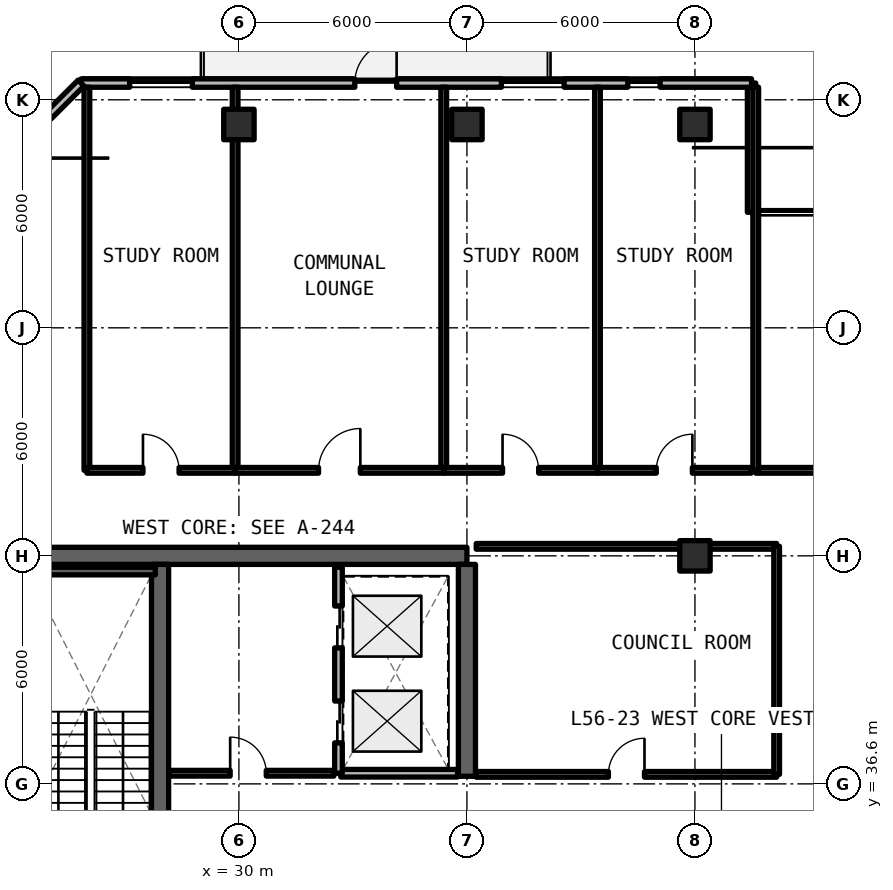
"""IFC4 building model, lengths in metres.
Left out: names, types, materials, properties, quantities, classifications, styles, units other than length and angle.
Written with IfcOpenShell. Run it as: python <this file> out.ifc"""

import sys

from ifc_helpers import new_model, si_unit, direction, frame, frame_2d, origin, origin_2d, place, context, subcontext, project, spatial, rectangle, extrude, element, fill, save


model = new_model("IFC4")
c1 = context("Model", 3, precision=1e-05, world=origin(), true_north=direction((0.0, 1.0)))
c2 = subcontext(c1, "Body", "Model", "MODEL_VIEW")
j1 = project(units=[si_unit("LENGTHUNIT", "METRE"), si_unit("PLANEANGLEUNIT", "RADIAN")], contexts=[c1])
p1 = place(None, origin())
s1 = spatial("IfcSite", under=j1, at=p1, CompositionType="ELEMENT")
p2 = place(p1, origin())
s2 = spatial("IfcBuilding", under=s1, at=p2, CompositionType="ELEMENT")
p3 = place(p2, frame((0.0, 0.0, 201.63)))
s3 = spatial("IfcBuildingStorey", under=s2, at=p3, CompositionType="ELEMENT", Elevation=201.63)
p4 = place(p3, frame((36.0, 42.6, 0.0), z_axis=(0.0, 0.0, 1.0), x_axis=(-1.0, 0.0, 0.0)))
e1 = element("IfcWall", 1, at=p4, inside=s3, PredefinedType="SHEAR", context=c2, shape_type="SweptSolid", body=[
    extrude(rectangle(XDim=12.0, YDim=0.45, at=frame_2d((6.0, 0.0))), origin(), (0.0, 0.0, 1.0), 3.3),
])
p5 = place(p3, frame((36.0, 36.8, 0.0), z_axis=(0.0, 0.0, 1.0), x_axis=(0.0, 1.0, 0.0)))
e2 = element("IfcWall", 2, at=p5, inside=s3, PredefinedType="SHEAR", context=c2, shape_type="SweptSolid", body=[
    extrude(rectangle(XDim=5.575, YDim=0.45, at=frame_2d((2.788, 0.0))), origin(), (0.0, 0.0, 1.0), 3.3),
])
p6 = place(p3, frame((27.925, 24.825, 0.0), z_axis=(0.0, 0.0, 1.0), x_axis=(0.0, 1.0, 0.0)))
e3 = element("IfcWall", 3, at=p6, inside=s3, PredefinedType="SHEAR", context=c2, shape_type="SweptSolid", body=[
    extrude(rectangle(XDim=17.55, YDim=0.45, at=frame_2d((8.775, 0.0))), origin(), (0.0, 0.0, 1.0), 3.3),
])
p7 = place(p6, frame((0.425, 0.0, 0.0)))
e4 = element("IfcOpeningElement", 4, at=p7, cuts=e3, PredefinedType="OPENING", context=c2, shape_type="SweptSolid", body=[
    extrude(rectangle(XDim=1.15, YDim=2.15, at=frame_2d((0.575, 1.075))), frame((0.0, 0.235, 0.0), z_axis=(0.0, -1.0, 0.0), x_axis=(1.0, 0.0, 0.0)), (0.0, 0.0, 1.0), 0.47),
])
p8 = place(p6, frame((9.625, 0.0, 0.0)))
e5 = element("IfcOpeningElement", 5, at=p8, cuts=e3, PredefinedType="OPENING", context=c2, shape_type="SweptSolid", body=[
    extrude(rectangle(XDim=1.15, YDim=2.15, at=frame_2d((0.575, 1.075))), frame((0.0, 0.235, 0.0), z_axis=(0.0, -1.0, 0.0), x_axis=(1.0, 0.0, 0.0)), (0.0, 0.0, 1.0), 0.47),
])
for number, where, z_axis, x_axis in (
    (6, (42.0, 42.6, 0.0), (0.0, 0.0, 1.0), (1.0, 0.0, 0.0)),
    (7, (30.0, 53.95, 0.0), (0.0, 0.0, 1.0), (1.0, 0.0, 0.0)),
    (8, (36.0, 53.95, 0.0), (0.0, 0.0, 1.0), (1.0, 0.0, 0.0)),
    (9, (42.0, 53.95, 0.0), (0.0, 0.0, 1.0), (1.0, 0.0, 0.0)),
):
    element("IfcColumn", number, at=place(p3, frame(where, z_axis=z_axis, x_axis=x_axis)), inside=s3, PredefinedType="COLUMN", context=c2, shape_type="SweptSolid", body=[
        extrude(rectangle(XDim=0.8, YDim=0.8, at=origin_2d()), origin(), (0.0, 0.0, 1.0), 3.3),
    ])
p9 = place(p3, frame((43.49, 51.64, 0.0), z_axis=(0.0, 0.0, 1.0), x_axis=(0.0, 1.0, 0.0)))
e10 = element("IfcWall", 10, at=p9, inside=s3, PredefinedType="SOLIDWALL", context=c2, shape_type="SweptSolid", body=[
    extrude(rectangle(XDim=3.4, YDim=0.22, at=frame_2d((1.7, 0.0))), origin(), (0.0, 0.0, 1.0), 3.08),
])
p10 = place(p3, frame((43.49, 55.04, 0.0), z_axis=(0.0, 0.0, 1.0), x_axis=(-1.0, 0.0, 0.0)))
e11 = element("IfcWall", 11, at=p10, inside=s3, PredefinedType="SOLIDWALL", context=c2, shape_type="SweptSolid", body=[
    extrude(rectangle(XDim=17.644, YDim=0.22, at=frame_2d((8.822, 0.0))), origin(), (0.0, 0.0, 1.0), 3.08),
])
p11 = place(p10, frame((9.34, 0.0, 0.0)))
e12 = element("IfcOpeningElement", 12, at=p11, cuts=e11, PredefinedType="OPENING", context=c2, shape_type="SweptSolid", body=[
    extrude(rectangle(XDim=1.1, YDim=2.15, at=frame_2d((0.55, 1.075))), frame((0.0, 0.12, 0.0), z_axis=(0.0, -1.0, 0.0), x_axis=(1.0, 0.0, 0.0)), (0.0, 0.0, 1.0), 0.24),
])
p12 = place(p10, frame((14.715, 0.0, 0.78)))
e13 = element("IfcOpeningElement", 13, at=p12, cuts=e11, PredefinedType="OPENING", context=c2, shape_type="SweptSolid", body=[
    extrude(rectangle(XDim=1.65, YDim=1.66, at=frame_2d((0.825, 0.83))), frame((0.0, 0.12, 0.0), z_axis=(0.0, -1.0, 0.0), x_axis=(1.0, 0.0, 0.0)), (0.0, 0.0, 1.0), 0.24),
])
p13 = place(p10, frame((4.932, 0.0, 0.78)))
e14 = element("IfcOpeningElement", 14, at=p13, cuts=e11, PredefinedType="OPENING", context=c2, shape_type="SweptSolid", body=[
    extrude(rectangle(XDim=1.65, YDim=1.66, at=frame_2d((0.825, 0.83))), frame((0.0, 0.12, 0.0), z_axis=(0.0, -1.0, 0.0), x_axis=(1.0, 0.0, 0.0)), (0.0, 0.0, 1.0), 0.24),
])
p14 = place(p10, frame((2.407, 0.0, 0.78)))
e15 = element("IfcOpeningElement", 15, at=p14, cuts=e11, PredefinedType="OPENING", context=c2, shape_type="SweptSolid", body=[
    extrude(rectangle(XDim=0.85, YDim=1.65, at=frame_2d((0.425, 0.825))), frame((0.0, 0.12, 0.0), z_axis=(0.0, -1.0, 0.0), x_axis=(1.0, 0.0, 0.0)), (0.0, 0.0, 1.0), 0.24),
])
p15 = place(p3, frame((25.846, 55.04, 0.0), z_axis=(0.0, 0.0, 1.0), x_axis=(-0.707106781187, -0.707106781187, 0.0)))
e16 = element("IfcWall", 16, at=p15, inside=s3, PredefinedType="SOLIDWALL", context=c2, shape_type="SweptSolid", body=[
    extrude(rectangle(XDim=5.849, YDim=0.22, at=frame_2d((2.924, 0.0))), origin(), (0.0, 0.0, 1.0), 3.08),
])
p16 = place(p15, frame((1.224, 0.0, 0.78)))
e17 = element("IfcOpeningElement", 17, at=p16, cuts=e16, PredefinedType="OPENING", context=c2, shape_type="SweptSolid", body=[
    extrude(rectangle(XDim=3.4, YDim=1.66, at=frame_2d((1.7, 0.83))), frame((0.0, 0.12, 0.0), z_axis=(0.0, -1.0, 0.0), x_axis=(1.0, 0.0, 0.0)), (0.0, 0.0, 1.0), 0.24),
])
p17 = place(p3, frame((28.17, 36.88, 0.0), z_axis=(0.0, 0.0, 1.0), x_axis=(1.0, 0.0, 0.0)))
e18 = element("IfcWall", 18, at=p17, inside=s3, PredefinedType="SOLIDWALL", context=c2, shape_type="SweptSolid", body=[
    extrude(rectangle(XDim=4.33, YDim=0.15, at=frame_2d((2.165, 0.0))), origin(), (0.0, 0.0, 1.0), 2.35),
])
p18 = place(p17, frame((1.6, 0.0, 0.0)))
e19 = element("IfcOpeningElement", 19, at=p18, cuts=e18, PredefinedType="OPENING", context=c2, shape_type="SweptSolid", body=[
    extrude(rectangle(XDim=0.95, YDim=2.15, at=frame_2d((0.475, 1.075))), frame((0.0, 0.085, 0.0), z_axis=(0.0, -1.0, 0.0), x_axis=(1.0, 0.0, 0.0)), (0.0, 0.0, 1.0), 0.17),
])
p19 = place(p3, frame((32.68, 36.88, 0.0), z_axis=(0.0, 0.0, 1.0), x_axis=(1.0, 0.0, 0.0)))
e20 = element("IfcWall", 20, at=p19, inside=s3, PredefinedType="SOLIDWALL", context=c2, shape_type="SweptSolid", body=[
    extrude(rectangle(XDim=3.075, YDim=0.2, at=frame_2d((1.538, 0.0))), origin(), (0.0, 0.0, 1.0), 2.35),
])
p20 = place(p3, frame((32.62, 36.88, 0.0), z_axis=(0.0, 0.0, 1.0), x_axis=(0.0, 1.0, 0.0)))
e21 = element("IfcWall", 21, at=p20, inside=s3, PredefinedType="SOLIDWALL", context=c2, shape_type="SweptSolid", body=[
    extrude(rectangle(XDim=5.42, YDim=0.2, at=frame_2d((2.71, 0.0))), origin(), (0.0, 0.0, 1.0), 2.35),
])
p21 = place(p20, frame((0.8, 0.0, 0.0)))
e22 = element("IfcOpeningElement", 22, at=p21, cuts=e21, PredefinedType="OPENING", context=c2, shape_type="SweptSolid", body=[
    extrude(rectangle(XDim=1.1, YDim=2.2, at=frame_2d((0.55, 1.1))), frame((0.0, 0.11, 0.0), z_axis=(0.0, -1.0, 0.0), x_axis=(1.0, 0.0, 0.0)), (0.0, 0.0, 1.0), 0.22),
])
p22 = place(p20, frame((3.3, 0.0, 0.0)))
e23 = element("IfcOpeningElement", 23, at=p22, cuts=e21, PredefinedType="OPENING", context=c2, shape_type="SweptSolid", body=[
    extrude(rectangle(XDim=1.1, YDim=2.2, at=frame_2d((0.55, 1.1))), frame((0.0, 0.11, 0.0), z_axis=(0.0, -1.0, 0.0), x_axis=(1.0, 0.0, 0.0)), (0.0, 0.0, 1.0), 0.22),
])
p23 = place(p3, frame((36.245, 36.85, 0.0), z_axis=(0.0, 0.0, 1.0), x_axis=(1.0, 0.0, 0.0)))
e24 = element("IfcWall", 24, at=p23, inside=s3, PredefinedType="SOLIDWALL", context=c2, shape_type="SweptSolid", body=[
    extrude(rectangle(XDim=7.905, YDim=0.15, at=frame_2d((3.952, 0.0))), origin(), (0.0, 0.0, 1.0), 2.35),
])
p24 = place(p23, frame((3.478, 0.0, 0.0)))
e25 = element("IfcOpeningElement", 25, at=p24, cuts=e24, PredefinedType="OPENING", context=c2, shape_type="SweptSolid", body=[
    extrude(rectangle(XDim=0.95, YDim=2.15, at=frame_2d((0.475, 1.075))), frame((0.0, 0.085, 0.0), z_axis=(0.0, -1.0, 0.0), x_axis=(1.0, 0.0, 0.0)), (0.0, 0.0, 1.0), 0.17),
])
p25 = place(p3, frame((36.245, 42.85, 0.0), z_axis=(0.0, 0.0, 1.0), x_axis=(1.0, 0.0, 0.0)))
e26 = element("IfcWall", 26, at=p25, inside=s3, PredefinedType="SOLIDWALL", context=c2, shape_type="SweptSolid", body=[
    extrude(rectangle(XDim=7.905, YDim=0.15, at=frame_2d((3.952, 0.0))), origin(), (0.0, 0.0, 1.0), 2.35),
])
p26 = place(p3, frame((44.15, 36.85, 0.0), z_axis=(0.0, 0.0, 1.0), x_axis=(0.0, 1.0, 0.0)))
e27 = element("IfcWall", 27, at=p26, inside=s3, PredefinedType="SOLIDWALL", context=c2, shape_type="SweptSolid", body=[
    extrude(rectangle(XDim=6.0, YDim=0.15, at=frame_2d((3.0, 0.0))), origin(), (0.0, 0.0, 1.0), 2.35),
])
p27 = place(p3, frame((43.6, 44.85, 0.0), z_axis=(0.0, 0.0, 1.0), x_axis=(1.0, 0.0, 0.0)))
e28 = element("IfcWall", 28, at=p27, inside=s3, PredefinedType="SOLIDWALL", context=c2, shape_type="SweptSolid", body=[
    extrude(rectangle(XDim=8.4, YDim=0.15, at=frame_2d((4.2, 0.0))), origin(), (0.0, 0.0, 1.0), 2.35),
])
p28 = place(p27, frame((3.65, 0.0, 0.0)))
e29 = element("IfcOpeningElement", 29, at=p28, cuts=e28, PredefinedType="OPENING", context=c2, shape_type="SweptSolid", body=[
    extrude(rectangle(XDim=1.1, YDim=2.15, at=frame_2d((0.55, 1.075))), frame((0.0, 0.085, 0.0), z_axis=(0.0, -1.0, 0.0), x_axis=(1.0, 0.0, 0.0)), (0.0, 0.0, 1.0), 0.17),
])
for number, where, z_axis, x_axis in (
    (30, (43.6, 44.85, 0.0), (0.0, 0.0, 1.0), (0.0, 1.0, 0.0)),
    (31, (26.0, 44.85, 0.0), (0.0, 0.0, 1.0), (0.0, 1.0, 0.0)),
    (32, (29.9, 44.85, 0.0), (0.0, 0.0, 1.0), (0.0, 1.0, 0.0)),
):
    element("IfcWall", number, at=place(p3, frame(where, z_axis=z_axis, x_axis=x_axis)), inside=s3, PredefinedType="SOLIDWALL", context=c2, shape_type="SweptSolid", body=[
        extrude(rectangle(XDim=10.08, YDim=0.15, at=frame_2d((5.04, 0.0))), origin(), (0.0, 0.0, 1.0), 2.35),
    ])
p29 = place(p3, frame((26.0, 44.85, 0.0), z_axis=(0.0, 0.0, 1.0), x_axis=(1.0, 0.0, 0.0)))
e33 = element("IfcWall", 33, at=p29, inside=s3, PredefinedType="SOLIDWALL", context=c2, shape_type="SweptSolid", body=[
    extrude(rectangle(XDim=3.9, YDim=0.15, at=frame_2d((1.95, 0.0))), origin(), (0.0, 0.0, 1.0), 2.35),
])
p30 = place(p29, frame((1.475, 0.0, 0.0)))
e34 = element("IfcOpeningElement", 34, at=p30, cuts=e33, PredefinedType="OPENING", context=c2, shape_type="SweptSolid", body=[
    extrude(rectangle(XDim=0.95, YDim=2.15, at=frame_2d((0.475, 1.075))), frame((0.0, 0.085, 0.0), z_axis=(0.0, -1.0, 0.0), x_axis=(1.0, 0.0, 0.0)), (0.0, 0.0, 1.0), 0.17),
])
p31 = place(p3, frame((35.39, 44.85, 0.0), z_axis=(0.0, 0.0, 1.0), x_axis=(0.0, 1.0, 0.0)))
e35 = element("IfcWall", 35, at=p31, inside=s3, PredefinedType="SOLIDWALL", context=c2, shape_type="SweptSolid", body=[
    extrude(rectangle(XDim=10.08, YDim=0.15, at=frame_2d((5.04, 0.0))), origin(), (0.0, 0.0, 1.0), 2.35),
])
p32 = place(p3, frame((29.9, 44.85, 0.0), z_axis=(0.0, 0.0, 1.0), x_axis=(1.0, 0.0, 0.0)))
e36 = element("IfcWall", 36, at=p32, inside=s3, PredefinedType="SOLIDWALL", context=c2, shape_type="SweptSolid", body=[
    extrude(rectangle(XDim=5.49, YDim=0.15, at=frame_2d((2.745, 0.0))), origin(), (0.0, 0.0, 1.0), 2.35),
])
p33 = place(p32, frame((2.195, 0.0, 0.0)))
e37 = element("IfcOpeningElement", 37, at=p33, cuts=e36, PredefinedType="OPENING", context=c2, shape_type="SweptSolid", body=[
    extrude(rectangle(XDim=1.1, YDim=2.15, at=frame_2d((0.55, 1.075))), frame((0.0, 0.085, 0.0), z_axis=(0.0, -1.0, 0.0), x_axis=(1.0, 0.0, 0.0)), (0.0, 0.0, 1.0), 0.17),
])
p34 = place(p3, frame((39.435, 44.85, 0.0), z_axis=(0.0, 0.0, 1.0), x_axis=(0.0, 1.0, 0.0)))
e38 = element("IfcWall", 38, at=p34, inside=s3, PredefinedType="SOLIDWALL", context=c2, shape_type="SweptSolid", body=[
    extrude(rectangle(XDim=10.08, YDim=0.15, at=frame_2d((5.04, 0.0))), origin(), (0.0, 0.0, 1.0), 2.35),
])
p35 = place(p3, frame((35.39, 44.85, 0.0), z_axis=(0.0, 0.0, 1.0), x_axis=(1.0, 0.0, 0.0)))
e39 = element("IfcWall", 39, at=p35, inside=s3, PredefinedType="SOLIDWALL", context=c2, shape_type="SweptSolid", body=[
    extrude(rectangle(XDim=4.045, YDim=0.15, at=frame_2d((2.022, 0.0))), origin(), (0.0, 0.0, 1.0), 2.35),
])
p36 = place(p35, frame((1.548, 0.0, 0.0)))
e40 = element("IfcOpeningElement", 40, at=p36, cuts=e39, PredefinedType="OPENING", context=c2, shape_type="SweptSolid", body=[
    extrude(rectangle(XDim=0.95, YDim=2.15, at=frame_2d((0.475, 1.075))), frame((0.0, 0.085, 0.0), z_axis=(0.0, -1.0, 0.0), x_axis=(1.0, 0.0, 0.0)), (0.0, 0.0, 1.0), 0.17),
])
p37 = place(p3, frame((39.435, 44.85, 0.0), z_axis=(0.0, 0.0, 1.0), x_axis=(1.0, 0.0, 0.0)))
e41 = element("IfcWall", 41, at=p37, inside=s3, PredefinedType="SOLIDWALL", context=c2, shape_type="SweptSolid", body=[
    extrude(rectangle(XDim=4.045, YDim=0.15, at=frame_2d((2.022, 0.0))), origin(), (0.0, 0.0, 1.0), 2.35),
])
p38 = place(p37, frame((1.547, 0.0, 0.0)))
e42 = element("IfcOpeningElement", 42, at=p38, cuts=e41, PredefinedType="OPENING", context=c2, shape_type="SweptSolid", body=[
    extrude(rectangle(XDim=0.95, YDim=2.15, at=frame_2d((0.475, 1.075))), frame((0.0, 0.085, 0.0), z_axis=(0.0, -1.0, 0.0), x_axis=(1.0, 0.0, 0.0)), (0.0, 0.0, 1.0), 0.17),
])
p39 = place(p3, frame((27.8, 42.2, 0.0), z_axis=(0.0, 0.0, 1.0), x_axis=(-1.0, 0.0, 0.0)))
e43 = element("IfcWall", 43, at=p39, inside=s3, PredefinedType="SOLIDWALL", context=c2, shape_type="SweptSolid", body=[
    extrude(rectangle(XDim=3.4, YDim=0.2, at=frame_2d((1.7, 0.0))), origin(), (0.0, 0.0, 1.0), 3.3),
])
p40 = place(p11, frame((1.1, 0.0, 0.0), z_axis=(0.0, 0.0, 1.0), x_axis=(-1.0, 0.0, 0.0)))
e44 = element("IfcDoor", 44, at=p40, inside=s3, OperationType="SINGLE_SWING_RIGHT", PredefinedType="DOOR", context=c2, shape_type="SweptSolid", body=[
    extrude(rectangle(XDim=1.1, YDim=2.15, at=frame_2d((0.55, 1.075))), frame((0.0, 0.025, 0.0), z_axis=(0.0, -1.0, 0.0), x_axis=(1.0, 0.0, 0.0)), (0.0, 0.0, 1.0), 0.05),
])
fill(e12, e44)
p41 = place(p12, origin())
e45 = element("IfcWindow", 45, at=p41, inside=s3, PartitioningType="SINGLE_PANEL", PredefinedType="WINDOW", context=c2, shape_type="SweptSolid", body=[
    extrude(rectangle(XDim=1.65, YDim=1.66, at=frame_2d((0.825, 0.83))), frame((0.0, 0.03, 0.0), z_axis=(0.0, -1.0, 0.0), x_axis=(1.0, 0.0, 0.0)), (0.0, 0.0, 1.0), 0.06),
])
fill(e13, e45)
p42 = place(p13, origin())
e46 = element("IfcWindow", 46, at=p42, inside=s3, PartitioningType="SINGLE_PANEL", PredefinedType="WINDOW", context=c2, shape_type="SweptSolid", body=[
    extrude(rectangle(XDim=1.65, YDim=1.66, at=frame_2d((0.825, 0.83))), frame((0.0, 0.03, 0.0), z_axis=(0.0, -1.0, 0.0), x_axis=(1.0, 0.0, 0.0)), (0.0, 0.0, 1.0), 0.06),
])
fill(e14, e46)
p43 = place(p14, origin())
e47 = element("IfcWindow", 47, at=p43, inside=s3, PartitioningType="SINGLE_PANEL", PredefinedType="WINDOW", context=c2, shape_type="SweptSolid", body=[
    extrude(rectangle(XDim=0.85, YDim=1.65, at=frame_2d((0.425, 0.825))), frame((0.0, 0.03, 0.0), z_axis=(0.0, -1.0, 0.0), x_axis=(1.0, 0.0, 0.0)), (0.0, 0.0, 1.0), 0.06),
])
fill(e15, e47)
p44 = place(p18, origin())
e48 = element("IfcDoor", 48, at=p44, inside=s3, OperationType="SINGLE_SWING_LEFT", PredefinedType="DOOR", context=c2, shape_type="SweptSolid", body=[
    extrude(rectangle(XDim=0.95, YDim=2.15, at=frame_2d((0.475, 1.075))), frame((0.0, 0.025, 0.0), z_axis=(0.0, -1.0, 0.0), x_axis=(1.0, 0.0, 0.0)), (0.0, 0.0, 1.0), 0.05),
])
fill(e19, e48)
p45 = place(p21, origin())
e49 = element("IfcDoor", 49, at=p45, inside=s3, OperationType="SLIDING_TO_LEFT", PredefinedType="DOOR", context=c2, shape_type="SweptSolid", body=[
    extrude(rectangle(XDim=1.1, YDim=2.2, at=frame_2d((0.55, 1.1))), frame((0.0, 0.025, 0.0), z_axis=(0.0, -1.0, 0.0), x_axis=(1.0, 0.0, 0.0)), (0.0, 0.0, 1.0), 0.05),
])
fill(e22, e49)
p46 = place(p22, origin())
e50 = element("IfcDoor", 50, at=p46, inside=s3, OperationType="SLIDING_TO_RIGHT", PredefinedType="DOOR", context=c2, shape_type="SweptSolid", body=[
    extrude(rectangle(XDim=1.1, YDim=2.2, at=frame_2d((0.55, 1.1))), frame((0.0, 0.025, 0.0), z_axis=(0.0, -1.0, 0.0), x_axis=(1.0, 0.0, 0.0)), (0.0, 0.0, 1.0), 0.05),
])
fill(e23, e50)
p47 = place(p24, origin())
e51 = element("IfcDoor", 51, at=p47, inside=s3, OperationType="SINGLE_SWING_RIGHT", PredefinedType="DOOR", context=c2, shape_type="SweptSolid", body=[
    extrude(rectangle(XDim=0.95, YDim=2.15, at=frame_2d((0.475, 1.075))), frame((0.0, 0.025, 0.0), z_axis=(0.0, -1.0, 0.0), x_axis=(1.0, 0.0, 0.0)), (0.0, 0.0, 1.0), 0.05),
])
fill(e25, e51)
p48 = place(p30, origin())
e52 = element("IfcDoor", 52, at=p48, inside=s3, OperationType="SINGLE_SWING_LEFT", PredefinedType="DOOR", context=c2, shape_type="SweptSolid", body=[
    extrude(rectangle(XDim=0.95, YDim=2.15, at=frame_2d((0.475, 1.075))), frame((0.0, 0.025, 0.0), z_axis=(0.0, -1.0, 0.0), x_axis=(1.0, 0.0, 0.0)), (0.0, 0.0, 1.0), 0.05),
])
fill(e34, e52)
p49 = place(p33, origin())
e53 = element("IfcDoor", 53, at=p49, inside=s3, OperationType="SINGLE_SWING_RIGHT", PredefinedType="DOOR", context=c2, shape_type="SweptSolid", body=[
    extrude(rectangle(XDim=1.1, YDim=2.15, at=frame_2d((0.55, 1.075))), frame((0.0, 0.025, 0.0), z_axis=(0.0, -1.0, 0.0), x_axis=(1.0, 0.0, 0.0)), (0.0, 0.0, 1.0), 0.05),
])
fill(e37, e53)
p50 = place(p36, origin())
e54 = element("IfcDoor", 54, at=p50, inside=s3, OperationType="SINGLE_SWING_LEFT", PredefinedType="DOOR", context=c2, shape_type="SweptSolid", body=[
    extrude(rectangle(XDim=0.95, YDim=2.15, at=frame_2d((0.475, 1.075))), frame((0.0, 0.025, 0.0), z_axis=(0.0, -1.0, 0.0), x_axis=(1.0, 0.0, 0.0)), (0.0, 0.0, 1.0), 0.05),
])
fill(e40, e54)
p51 = place(p38, origin())
e55 = element("IfcDoor", 55, at=p51, inside=s3, OperationType="SINGLE_SWING_RIGHT", PredefinedType="DOOR", context=c2, shape_type="SweptSolid", body=[
    extrude(rectangle(XDim=0.95, YDim=2.15, at=frame_2d((0.475, 1.075))), frame((0.0, 0.025, 0.0), z_axis=(0.0, -1.0, 0.0), x_axis=(1.0, 0.0, 0.0)), (0.0, 0.0, 1.0), 0.05),
])
fill(e42, e55)
save(model, sys.argv[1])
